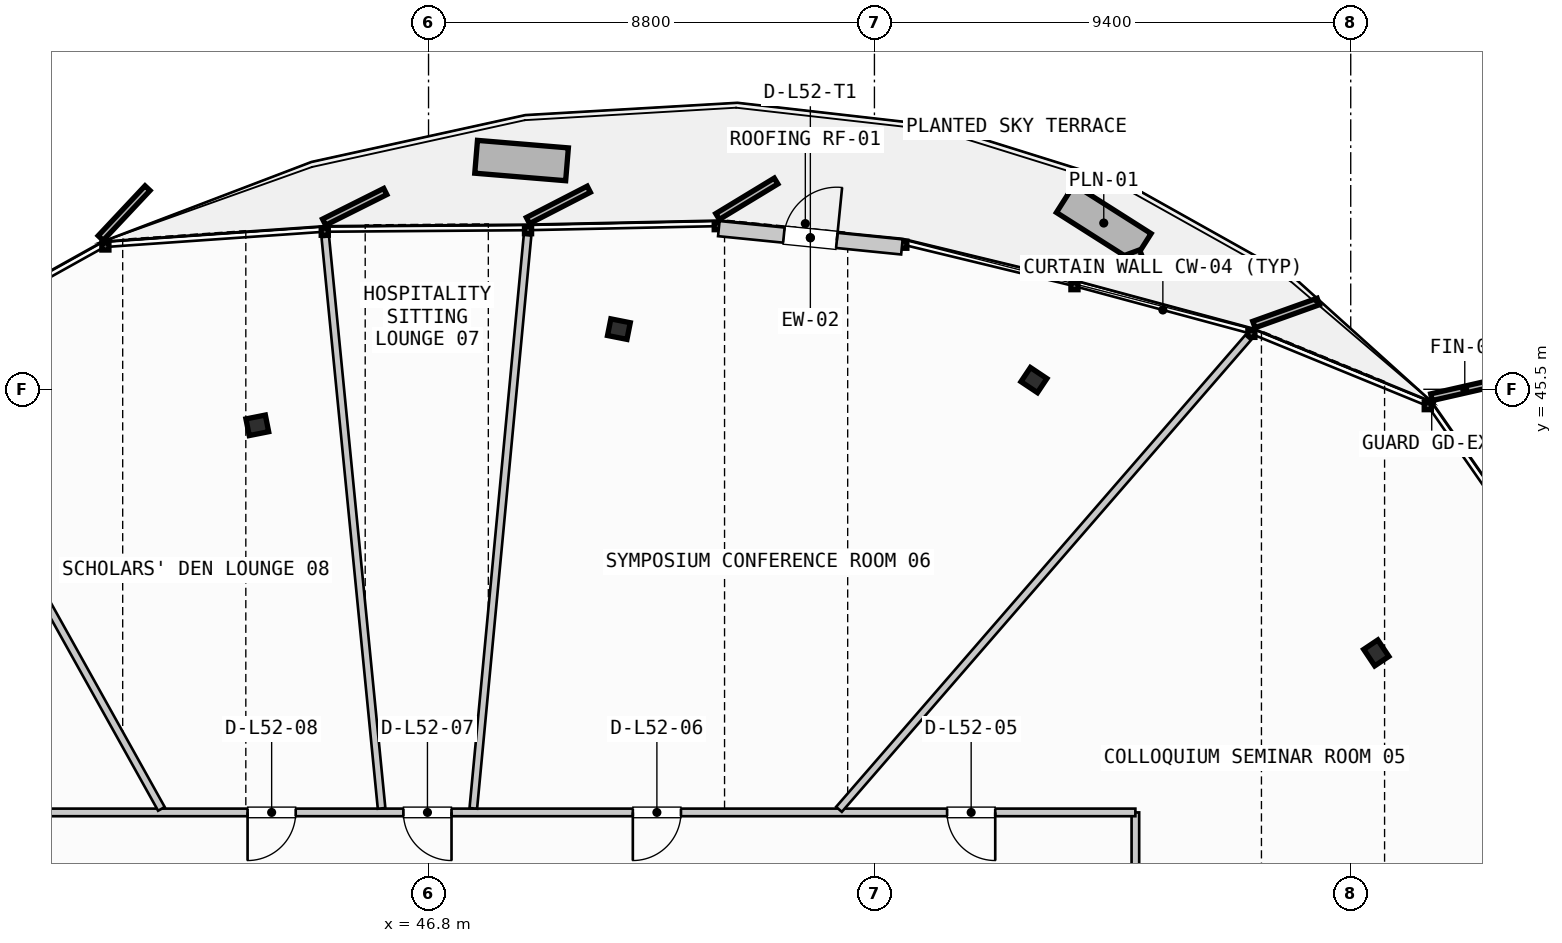
"""IFC4 building model, lengths in metres.
Left out: names, types, materials, properties, quantities, classifications, styles, units other than length and angle.
Written with IfcOpenShell. Run it as: python <this file> out.ifc"""

import sys

from ifc_helpers import new_model, si_unit, direction, frame, frame_2d, origin, origin_2d, place, context, subcontext, project, spatial, rectangle, i_section, extrude, source, transform, mapped, element, fill, save


model = new_model("IFC4")
c1 = context("Model", 3, precision=1e-05, world=origin(), true_north=direction((0.0, 1.0)))
c2 = subcontext(c1, "Body", "Model", "MODEL_VIEW")
j1 = project(units=[si_unit("LENGTHUNIT", "METRE"), si_unit("PLANEANGLEUNIT", "RADIAN")], contexts=[c1])
p1 = place(None, origin())
s1 = spatial("IfcSite", under=j1, at=p1, CompositionType="ELEMENT")
p2 = place(p1, origin())
s2 = spatial("IfcBuilding", under=s1, at=p2, CompositionType="ELEMENT")
p3 = place(p2, frame((0.0, 0.0, 200.9)))
s3 = spatial("IfcBuildingStorey", under=s2, at=p3, CompositionType="ELEMENT", Elevation=200.9)
m1 = source(origin(), c2, "Body", "SweptSolid", [
    extrude(i_section(OverallWidth=0.391, OverallDepth=0.335, WebThickness=0.023, FlangeThickness=0.034, FilletRadius=0.015, at=origin_2d()), origin(), (0.0, 0.0, 1.0), 3.26),
])
for number, where, z_axis, x_axis in (
    (1, (65.504, 40.298, 0.0), (0.0, 0.0, 1.0), (0.831, 0.556, 0.0)),
    (2, (58.748, 45.681, 0.0), (0.0, 0.0, 1.0), (0.556, 0.831, 0.0)),
    (3, (50.557, 46.688, 0.0), (0.0, 0.0, 1.0), (0.195, 0.981, 0.0)),
    (4, (43.421, 44.789, 0.0), (0.0, 0.0, 1.0), (-0.195, 0.981, 0.0)),
):
    element("IfcColumn", number, at=place(p3, frame(where, z_axis=z_axis, x_axis=x_axis)), inside=s3, PredefinedType="COLUMN", context=c2, shape_type="MappedRepresentation", body=[
        mapped(m1, transform((0.0, 0.0, 0.0), scale=1.0)),
    ])
p4 = place(p3, frame((52.529, 48.671, 0.0), z_axis=(0.0, 0.0, 1.0), x_axis=(0.995043844686, -0.099437151776, 0.0)))
e5 = element("IfcWall", 5, at=p4, inside=s3, PredefinedType="SOLIDWALL", context=c2, shape_type="SweptSolid", body=[
    extrude(rectangle(XDim=3.631, YDim=0.3, at=frame_2d((1.816, 0.0))), origin(), (0.0, 0.0, 1.0), 2.735),
])
p5 = place(p4, frame((1.291, 0.0, 0.0)))
e6 = element("IfcOpeningElement", 6, at=p5, cuts=e5, PredefinedType="OPENING", context=c2, shape_type="SweptSolid", body=[
    extrude(rectangle(XDim=1.05, YDim=2.2, at=frame_2d((0.525, 1.1))), frame((0.0, 0.16, 0.0), z_axis=(0.0, -1.0, 0.0), x_axis=(1.0, 0.0, 0.0)), (0.0, 0.0, 1.0), 0.32),
])
p6 = place(p3, frame((60.75, 34.5, 0.0), z_axis=(0.0, 0.0, 1.0), x_axis=(0.0, 1.0, 0.0)))
e7 = element("IfcWall", 7, at=p6, inside=s3, PredefinedType="PARTITIONING", context=c2, shape_type="SweptSolid", body=[
    extrude(rectangle(XDim=2.65, YDim=0.15, at=frame_2d((1.325, 0.0))), origin(), (0.0, 0.0, 1.0), 2.595),
])
p7 = place(p3, frame((60.75, 37.15, 0.0), z_axis=(0.0, 0.0, 1.0), x_axis=(-1.0, 0.0, 0.0)))
e8 = element("IfcWall", 8, at=p7, inside=s3, PredefinedType="PARTITIONING", context=c2, shape_type="SweptSolid", body=[
    extrude(rectangle(XDim=28.35, YDim=0.15, at=frame_2d((14.175, 0.0))), origin(), (0.0, 0.0, 1.0), 2.595),
])
p8 = place(p7, frame((2.766, 0.0, 0.0)))
e9 = element("IfcOpeningElement", 9, at=p8, cuts=e8, PredefinedType="OPENING", context=c2, shape_type="SweptSolid", body=[
    extrude(rectangle(XDim=0.95, YDim=2.15, at=frame_2d((0.475, 1.075))), frame((0.0, 0.085, 0.0), z_axis=(0.0, -1.0, 0.0), x_axis=(1.0, 0.0, 0.0)), (0.0, 0.0, 1.0), 0.17),
])
p9 = place(p7, frame((8.968, 0.0, 0.0)))
e10 = element("IfcOpeningElement", 10, at=p9, cuts=e8, PredefinedType="OPENING", context=c2, shape_type="SweptSolid", body=[
    extrude(rectangle(XDim=0.95, YDim=2.15, at=frame_2d((0.475, 1.075))), frame((0.0, 0.085, 0.0), z_axis=(0.0, -1.0, 0.0), x_axis=(1.0, 0.0, 0.0)), (0.0, 0.0, 1.0), 0.17),
])
p10 = place(p7, frame((13.496, 0.0, 0.0)))
e11 = element("IfcOpeningElement", 11, at=p10, cuts=e8, PredefinedType="OPENING", context=c2, shape_type="SweptSolid", body=[
    extrude(rectangle(XDim=0.95, YDim=2.15, at=frame_2d((0.475, 1.075))), frame((0.0, 0.085, 0.0), z_axis=(0.0, -1.0, 0.0), x_axis=(1.0, 0.0, 0.0)), (0.0, 0.0, 1.0), 0.17),
])
p11 = place(p7, frame((16.571, 0.0, 0.0)))
e12 = element("IfcOpeningElement", 12, at=p11, cuts=e8, PredefinedType="OPENING", context=c2, shape_type="SweptSolid", body=[
    extrude(rectangle(XDim=0.95, YDim=2.15, at=frame_2d((0.475, 1.075))), frame((0.0, 0.085, 0.0), z_axis=(0.0, -1.0, 0.0), x_axis=(1.0, 0.0, 0.0)), (0.0, 0.0, 1.0), 0.17),
])
p12 = place(p7, frame((23.002, 0.0, 0.0)))
e13 = element("IfcOpeningElement", 13, at=p12, cuts=e8, PredefinedType="OPENING", context=c2, shape_type="SweptSolid", body=[
    extrude(rectangle(XDim=0.95, YDim=2.15, at=frame_2d((0.475, 1.075))), frame((0.0, 0.085, 0.0), z_axis=(0.0, -1.0, 0.0), x_axis=(1.0, 0.0, 0.0)), (0.0, 0.0, 1.0), 0.17),
])
p13 = place(p3, frame((54.9, 37.21, 0.0), z_axis=(0.0, 0.0, 1.0), x_axis=(0.655252574178, 0.75540986493, 0.0)))
e14 = element("IfcWall", 14, at=p13, inside=s3, PredefinedType="PARTITIONING", context=c2, shape_type="SweptSolid", body=[
    extrude(rectangle(XDim=12.322, YDim=0.15, at=frame_2d((6.161, 0.0))), origin(), (0.0, 0.0, 1.0), 2.595),
])
p14 = place(p3, frame((47.684, 37.229, 0.0), z_axis=(0.0, 0.0, 1.0), x_axis=(0.094251326159, 0.995548435546, 0.0)))
e15 = element("IfcWall", 15, at=p14, inside=s3, PredefinedType="PARTITIONING", context=c2, shape_type="SweptSolid", body=[
    extrude(rectangle(XDim=11.361, YDim=0.15, at=frame_2d((5.681, 0.0))), origin(), (0.0, 0.0, 1.0), 2.595),
])
p15 = place(p3, frame((45.873, 37.229, 0.0), z_axis=(0.0, 0.0, 1.0), x_axis=(-0.098044940059, 0.995181988246, 0.0)))
e16 = element("IfcWall", 16, at=p15, inside=s3, PredefinedType="PARTITIONING", context=c2, shape_type="SweptSolid", body=[
    extrude(rectangle(XDim=11.335, YDim=0.15, at=frame_2d((5.667, 0.0))), origin(), (0.0, 0.0, 1.0), 2.595),
])
p16 = place(p3, frame((41.528, 37.22, 0.0), z_axis=(0.0, 0.0, 1.0), x_axis=(-0.487080330206, 0.873357173169, 0.0)))
e17 = element("IfcWall", 17, at=p16, inside=s3, PredefinedType="PARTITIONING", context=c2, shape_type="SweptSolid", body=[
    extrude(rectangle(XDim=10.134, YDim=0.15, at=frame_2d((5.067, 0.0))), origin(), (0.0, 0.0, 1.0), 2.595),
])
m2 = source(origin(), c2, "Body", "SweptSolid", [
    extrude(rectangle(XDim=1.05, YDim=2.2, at=frame_2d((0.525, 1.1))), frame((0.0, 0.025, 0.0), z_axis=(0.0, -1.0, 0.0), x_axis=(1.0, 0.0, 0.0)), (0.0, 0.0, 1.0), 0.05),
])
p17 = place(p5, origin())
e18 = element("IfcDoor", 18, at=p17, inside=s3, OperationType="SINGLE_SWING_RIGHT", PredefinedType="DOOR", context=c2, shape_type="MappedRepresentation", body=[
    mapped(m2, transform((0.0, 0.0, 0.0), scale=1.0)),
])
fill(e6, e18)
m3 = source(origin(), c2, "Body", "SweptSolid", [
    extrude(rectangle(XDim=0.95, YDim=2.15, at=frame_2d((0.475, 1.075))), frame((0.0, 0.025, 0.0), z_axis=(0.0, -1.0, 0.0), x_axis=(1.0, 0.0, 0.0)), (0.0, 0.0, 1.0), 0.05),
])
p18 = place(p8, origin())
e19 = element("IfcDoor", 19, at=p18, inside=s3, OperationType="SINGLE_SWING_LEFT", PredefinedType="DOOR", context=c2, shape_type="MappedRepresentation", body=[
    mapped(m3, transform((0.0, 0.0, 0.0), scale=1.0)),
])
fill(e9, e19)
p19 = place(p9, origin())
e20 = element("IfcDoor", 20, at=p19, inside=s3, OperationType="SINGLE_SWING_RIGHT", PredefinedType="DOOR", context=c2, shape_type="MappedRepresentation", body=[
    mapped(m3, transform((0.0, 0.0, 0.0), scale=1.0)),
])
fill(e10, e20)
p20 = place(p10, origin())
e21 = element("IfcDoor", 21, at=p20, inside=s3, OperationType="SINGLE_SWING_LEFT", PredefinedType="DOOR", context=c2, shape_type="MappedRepresentation", body=[
    mapped(m3, transform((0.0, 0.0, 0.0), scale=1.0)),
])
fill(e11, e21)
p21 = place(p11, origin())
e22 = element("IfcDoor", 22, at=p21, inside=s3, OperationType="SINGLE_SWING_RIGHT", PredefinedType="DOOR", context=c2, shape_type="MappedRepresentation", body=[
    mapped(m3, transform((0.0, 0.0, 0.0), scale=1.0)),
])
fill(e12, e22)
save(model, sys.argv[1])
